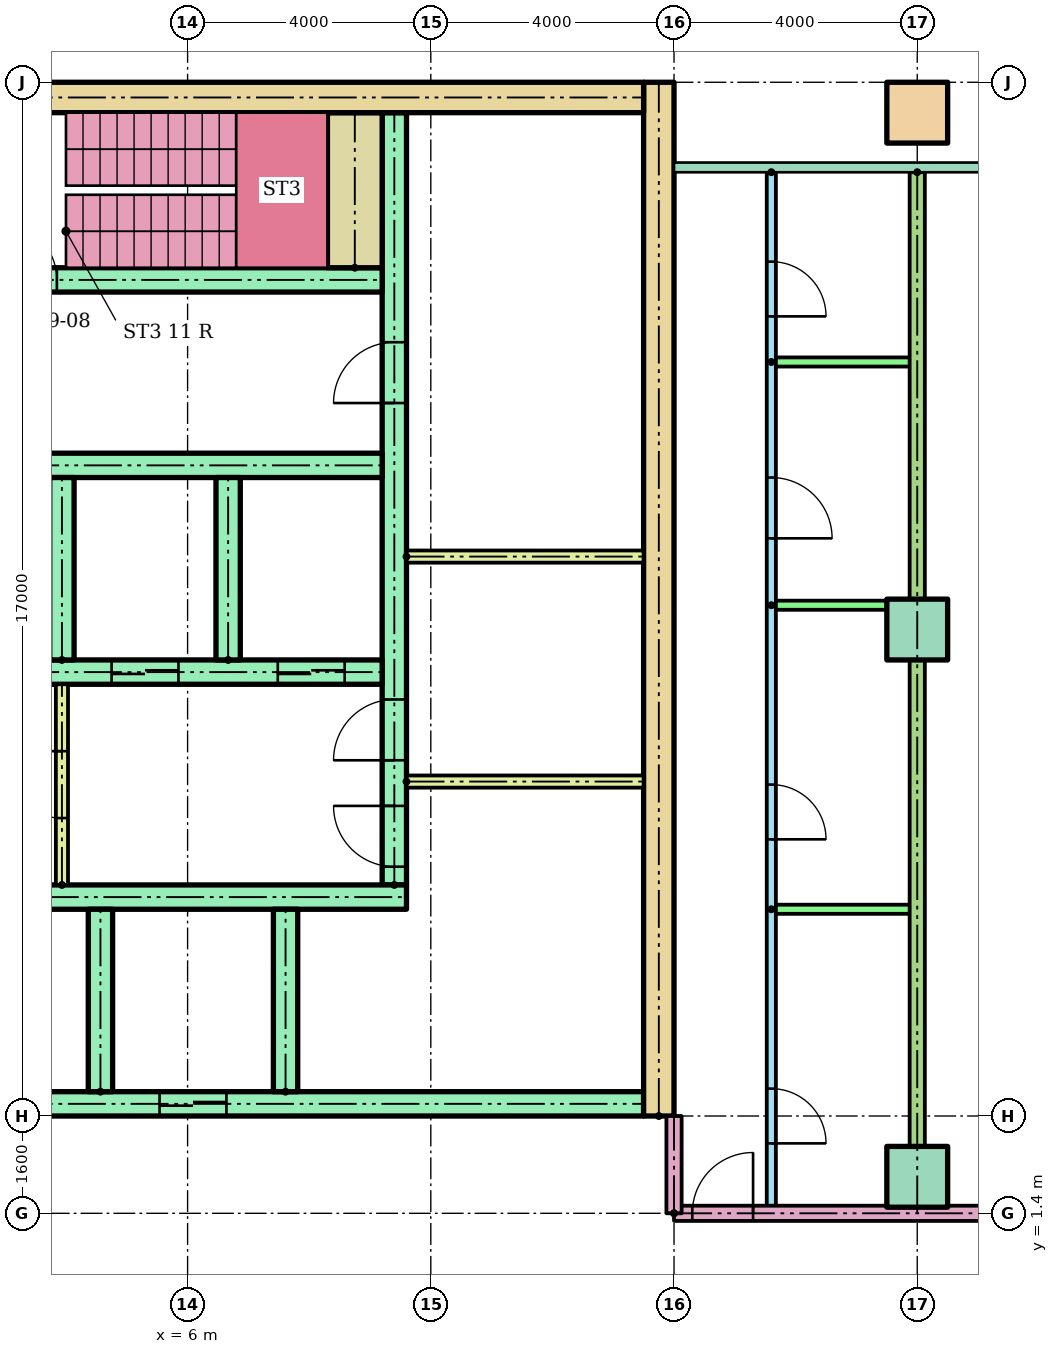
"""IFC4 building model, lengths in metres.
Left out: names, types, materials, properties, quantities, classifications, styles, units other than length and angle.
Written with IfcOpenShell. Run it as: python <this file> out.ifc"""

import sys

from ifc_helpers import new_model, si_unit, direction, frame, frame_2d, origin, origin_2d, place, context, subcontext, project, spatial, rectangle, hollow_rectangle, extrude, element, fill, save


model = new_model("IFC4")
c1 = context("Model", 3, precision=1e-05, world=origin(), true_north=direction((0.0, 1.0)))
c2 = subcontext(c1, "Body", "Model", "MODEL_VIEW")
j1 = project(units=[si_unit("LENGTHUNIT", "METRE"), si_unit("PLANEANGLEUNIT", "RADIAN")], contexts=[c1])
p1 = place(None, origin())
s1 = spatial("IfcSite", under=j1, at=p1, CompositionType="ELEMENT")
p2 = place(p1, origin())
s2 = spatial("IfcBuilding", under=s1, at=p2, CompositionType="ELEMENT")
p3 = place(p2, frame((0.0, 0.0, 37.7)))
s3 = spatial("IfcBuildingStorey", under=s2, at=p3, CompositionType="ELEMENT", Elevation=37.7)
for number, where in (
    (1, (18.0, 2.0, 0.0)),
    (2, (18.0, 11.0, 0.0)),
):
    element("IfcColumn", number, at=place(p3, frame(where)), inside=s3, PredefinedType="COLUMN", context=c2, shape_type="SweptSolid", body=[
        extrude(rectangle(XDim=1.0, YDim=1.0, at=origin_2d()), origin(), (0.0, 0.0, 1.0), 3.9),
    ])
p4 = place(p3, frame((18.0, 19.5, 0.0)))
e3 = element("IfcColumn", 3, at=p4, inside=s3, PredefinedType="COLUMN", context=c2, shape_type="SweptSolid", body=[
    extrude(hollow_rectangle(XDim=1.0, YDim=1.0, WallThickness=0.05, at=origin_2d()), origin(), (0.0, 0.0, 1.0), 3.9),
])
p5 = place(p3, frame((13.75, 3.0, 0.0), z_axis=(0.0, 0.0, 1.0), x_axis=(0.0, 1.0, 0.0)))
e4 = element("IfcWall", 4, at=p5, inside=s3, PredefinedType="SHEAR", context=c2, shape_type="SweptSolid", body=[
    extrude(rectangle(XDim=17.0, YDim=0.5, at=frame_2d((8.5, 0.0))), origin(), (0.0, 0.0, 1.0), 3.62),
])
p6 = place(p3, frame((-13.5, 19.75, 0.0)))
e5 = element("IfcWall", 5, at=p6, inside=s3, PredefinedType="SHEAR", context=c2, shape_type="SweptSolid", body=[
    extrude(rectangle(XDim=27.0, YDim=0.5, at=frame_2d((13.5, 0.0))), origin(), (0.0, 0.0, 1.0), 3.62),
])
p7 = place(p3, frame((9.4, 6.8, 0.0), z_axis=(0.0, 0.0, 1.0), x_axis=(0.0, 1.0, 0.0)))
e6 = element("IfcWall", 6, at=p7, inside=s3, PredefinedType="SHEAR", context=c2, shape_type="SweptSolid", body=[
    extrude(rectangle(XDim=12.7, YDim=0.4, at=frame_2d((6.35, 0.0))), origin(), (0.0, 0.0, 1.0), 3.62),
])
p8 = place(p7, frame((0.3, 0.0, 0.0)))
e7 = element("IfcOpeningElement", 7, at=p8, cuts=e6, PredefinedType="OPENING", context=c2, shape_type="SweptSolid", body=[
    extrude(rectangle(XDim=1.0, YDim=2.1, at=frame_2d((0.5, 1.05))), frame((0.0, 0.21, 0.0), z_axis=(0.0, -1.0, 0.0), x_axis=(1.0, 0.0, 0.0)), (0.0, 0.0, 1.0), 0.42),
])
p9 = place(p7, frame((2.05, 0.0, 0.0)))
e8 = element("IfcOpeningElement", 8, at=p9, cuts=e6, PredefinedType="OPENING", context=c2, shape_type="SweptSolid", body=[
    extrude(rectangle(XDim=1.0, YDim=2.1, at=frame_2d((0.5, 1.05))), frame((0.0, 0.21, 0.0), z_axis=(0.0, -1.0, 0.0), x_axis=(1.0, 0.0, 0.0)), (0.0, 0.0, 1.0), 0.42),
])
p10 = place(p7, frame((7.925, 0.0, 0.0)))
e9 = element("IfcOpeningElement", 9, at=p10, cuts=e6, PredefinedType="OPENING", context=c2, shape_type="SweptSolid", body=[
    extrude(rectangle(XDim=1.0, YDim=2.1, at=frame_2d((0.5, 1.05))), frame((0.0, 0.21, 0.0), z_axis=(0.0, -1.0, 0.0), x_axis=(1.0, 0.0, 0.0)), (0.0, 0.0, 1.0), 0.42),
])
p11 = place(p3, frame((-13.5, 3.2, 0.0)))
e10 = element("IfcWall", 10, at=p11, inside=s3, PredefinedType="SHEAR", context=c2, shape_type="SweptSolid", body=[
    extrude(rectangle(XDim=27.0, YDim=0.4, at=frame_2d((13.5, 0.0))), origin(), (0.0, 0.0, 1.0), 3.62),
])
p12 = place(p11, frame((6.861, 0.0, 0.0)))
e11 = element("IfcOpeningElement", 11, at=p12, cuts=e10, PredefinedType="OPENING", context=c2, shape_type="SweptSolid", body=[
    extrude(rectangle(XDim=1.1, YDim=2.1, at=frame_2d((0.55, 1.05))), frame((0.0, 0.21, 0.0), z_axis=(0.0, -1.0, 0.0), x_axis=(1.0, 0.0, 0.0)), (0.0, 0.0, 1.0), 0.42),
])
p13 = place(p11, frame((9.906, 0.0, 0.0)))
e12 = element("IfcOpeningElement", 12, at=p13, cuts=e10, PredefinedType="OPENING", context=c2, shape_type="SweptSolid", body=[
    extrude(rectangle(XDim=1.1, YDim=2.1, at=frame_2d((0.55, 1.05))), frame((0.0, 0.21, 0.0), z_axis=(0.0, -1.0, 0.0), x_axis=(1.0, 0.0, 0.0)), (0.0, 0.0, 1.0), 0.42),
])
p14 = place(p11, frame((15.994, 0.0, 0.0)))
e13 = element("IfcOpeningElement", 13, at=p14, cuts=e10, PredefinedType="OPENING", context=c2, shape_type="SweptSolid", body=[
    extrude(rectangle(XDim=1.1, YDim=2.1, at=frame_2d((0.55, 1.05))), frame((0.0, 0.21, 0.0), z_axis=(0.0, -1.0, 0.0), x_axis=(1.0, 0.0, 0.0)), (0.0, 0.0, 1.0), 0.42),
])
p15 = place(p11, frame((19.039, 0.0, 0.0)))
e14 = element("IfcOpeningElement", 14, at=p15, cuts=e10, PredefinedType="OPENING", context=c2, shape_type="SweptSolid", body=[
    extrude(rectangle(XDim=1.1, YDim=2.1, at=frame_2d((0.55, 1.05))), frame((0.0, 0.21, 0.0), z_axis=(0.0, -1.0, 0.0), x_axis=(1.0, 0.0, 0.0)), (0.0, 0.0, 1.0), 0.42),
])
p16 = place(p11, frame((12.6, 0.0, 0.0)))
e15 = element("IfcOpeningElement", 15, at=p16, cuts=e10, PredefinedType="OPENING", context=c2, shape_type="SweptSolid", body=[
    extrude(rectangle(XDim=1.8, YDim=2.1, at=frame_2d((0.9, 1.05))), frame((0.0, 0.21, 0.0), z_axis=(0.0, -1.0, 0.0), x_axis=(1.0, 0.0, 0.0)), (0.0, 0.0, 1.0), 0.42),
])
p17 = place(p3, frame((1.522, 6.6, 0.0)))
e16 = element("IfcWall", 16, at=p17, inside=s3, PredefinedType="SHEAR", context=c2, shape_type="SweptSolid", body=[
    extrude(rectangle(XDim=8.078, YDim=0.4, at=frame_2d((4.039, 0.0))), origin(), (0.0, 0.0, 1.0), 3.62),
])
for number, where, z_axis, x_axis in (
    (17, (4.567, 3.4, 0.0), (0.0, 0.0, 1.0), (0.0, 1.0, 0.0)),
    (18, (7.611, 3.4, 0.0), (0.0, 0.0, 1.0), (0.0, 1.0, 0.0)),
):
    element("IfcWall", number, at=place(p3, frame(where, z_axis=z_axis, x_axis=x_axis)), inside=s3, PredefinedType="SHEAR", context=c2, shape_type="SweptSolid", body=[
        extrude(rectangle(XDim=3.0, YDim=0.4, at=frame_2d((1.5, 0.0))), origin(), (0.0, 0.0, 1.0), 3.62),
    ])
p18 = place(p3, frame((1.2, 10.3, 0.0)))
e19 = element("IfcWall", 19, at=p18, inside=s3, PredefinedType="SHEAR", context=c2, shape_type="SweptSolid", body=[
    extrude(rectangle(XDim=8.0, YDim=0.4, at=frame_2d((4.0, 0.0))), origin(), (0.0, 0.0, 1.0), 3.62),
])
p19 = place(p18, frame((3.55, 0.0, 0.0)))
e20 = element("IfcOpeningElement", 20, at=p19, cuts=e19, PredefinedType="OPENING", context=c2, shape_type="SweptSolid", body=[
    extrude(rectangle(XDim=1.1, YDim=2.1, at=frame_2d((0.55, 1.05))), frame((0.0, 0.21, 0.0), z_axis=(0.0, -1.0, 0.0), x_axis=(1.0, 0.0, 0.0)), (0.0, 0.0, 1.0), 0.42),
])
p20 = place(p18, frame((6.283, 0.0, 0.0)))
e21 = element("IfcOpeningElement", 21, at=p20, cuts=e19, PredefinedType="OPENING", context=c2, shape_type="SweptSolid", body=[
    extrude(rectangle(XDim=1.1, YDim=2.1, at=frame_2d((0.55, 1.05))), frame((0.0, 0.21, 0.0), z_axis=(0.0, -1.0, 0.0), x_axis=(1.0, 0.0, 0.0)), (0.0, 0.0, 1.0), 0.42),
])
p21 = place(p18, frame((0.867, 0.0, 0.0)))
e22 = element("IfcOpeningElement", 22, at=p21, cuts=e19, PredefinedType="OPENING", context=c2, shape_type="SweptSolid", body=[
    extrude(rectangle(XDim=1.0, YDim=2.1, at=frame_2d((0.5, 1.05))), frame((0.0, 0.21, 0.0), z_axis=(0.0, -1.0, 0.0), x_axis=(1.0, 0.0, 0.0)), (0.0, 0.0, 1.0), 0.42),
])
p22 = place(p3, frame((1.2, 13.7, 0.0)))
e23 = element("IfcWall", 23, at=p22, inside=s3, PredefinedType="SHEAR", context=c2, shape_type="SweptSolid", body=[
    extrude(rectangle(XDim=8.0, YDim=0.4, at=frame_2d((4.0, 0.0))), origin(), (0.0, 0.0, 1.0), 3.62),
])
for number, where, z_axis, x_axis in (
    (24, (3.933, 10.5, 0.0), (0.0, 0.0, 1.0), (0.0, 1.0, 0.0)),
    (25, (6.667, 10.5, 0.0), (0.0, 0.0, 1.0), (0.0, 1.0, 0.0)),
):
    element("IfcWall", number, at=place(p3, frame(where, z_axis=z_axis, x_axis=x_axis)), inside=s3, PredefinedType="SHEAR", context=c2, shape_type="SweptSolid", body=[
        extrude(rectangle(XDim=3.0, YDim=0.4, at=frame_2d((1.5, 0.0))), origin(), (0.0, 0.0, 1.0), 3.62),
    ])
p23 = place(p3, frame((3.933, 6.8, 0.0), z_axis=(0.0, 0.0, 1.0), x_axis=(0.0, 1.0, 0.0)))
e26 = element("IfcWall", 26, at=p23, inside=s3, PredefinedType="PARTITIONING", context=c2, shape_type="SweptSolid", body=[
    extrude(rectangle(XDim=3.3, YDim=0.2, at=frame_2d((1.65, 0.0))), origin(), (0.0, 0.0, 1.0), 3.62),
])
p24 = place(p23, frame((1.1, 0.0, 0.0)))
e27 = element("IfcOpeningElement", 27, at=p24, cuts=e26, PredefinedType="OPENING", context=c2, shape_type="SweptSolid", body=[
    extrude(rectangle(XDim=1.1, YDim=2.1, at=frame_2d((0.55, 1.05))), frame((0.0, 0.11, 0.0), z_axis=(0.0, -1.0, 0.0), x_axis=(1.0, 0.0, 0.0)), (0.0, 0.0, 1.0), 0.22),
])
p25 = place(p3, frame((-9.2, 16.75, 0.0)))
e28 = element("IfcWall", 28, at=p25, inside=s3, PredefinedType="SHEAR", context=c2, shape_type="SweptSolid", body=[
    extrude(rectangle(XDim=18.4, YDim=0.4, at=frame_2d((9.2, 0.0))), origin(), (0.0, 0.0, 1.0), 3.62),
])
p26 = place(p25, frame((0.1, 0.0, 0.0)))
e29 = element("IfcOpeningElement", 29, at=p26, cuts=e28, PredefinedType="OPENING", context=c2, shape_type="SweptSolid", body=[
    extrude(rectangle(XDim=0.95, YDim=2.1, at=frame_2d((0.475, 1.05))), frame((0.0, 0.21, 0.0), z_axis=(0.0, -1.0, 0.0), x_axis=(1.0, 0.0, 0.0)), (0.0, 0.0, 1.0), 0.42),
])
p27 = place(p25, frame((6.1, 0.0, 0.0)))
e30 = element("IfcOpeningElement", 30, at=p27, cuts=e28, PredefinedType="OPENING", context=c2, shape_type="SweptSolid", body=[
    extrude(rectangle(XDim=0.95, YDim=2.1, at=frame_2d((0.475, 1.05))), frame((0.0, 0.21, 0.0), z_axis=(0.0, -1.0, 0.0), x_axis=(1.0, 0.0, 0.0)), (0.0, 0.0, 1.0), 0.42),
])
p28 = place(p25, frame((12.1, 0.0, 0.0)))
e31 = element("IfcOpeningElement", 31, at=p28, cuts=e28, PredefinedType="OPENING", context=c2, shape_type="SweptSolid", body=[
    extrude(rectangle(XDim=0.95, YDim=2.1, at=frame_2d((0.475, 1.05))), frame((0.0, 0.21, 0.0), z_axis=(0.0, -1.0, 0.0), x_axis=(1.0, 0.0, 0.0)), (0.0, 0.0, 1.0), 0.42),
])
p29 = place(p3, frame((8.75, 16.95, 0.0), z_axis=(0.0, 0.0, 1.0), x_axis=(0.0, 1.0, 0.0)))
e32 = element("IfcWall", 32, at=p29, inside=s3, PredefinedType="SHEAR", context=c2, shape_type="SweptSolid", body=[
    extrude(rectangle(XDim=2.55, YDim=0.9, at=frame_2d((1.275, 0.0))), origin(), (0.0, 0.0, 1.0), 3.62),
])
for number, where in (
    (33, (9.6, 8.5, 0.0)),
    (34, (9.6, 12.2, 0.0)),
):
    element("IfcWall", number, at=place(p3, frame(where)), inside=s3, PredefinedType="PARTITIONING", context=c2, shape_type="SweptSolid", body=[
        extrude(rectangle(XDim=3.9, YDim=0.2, at=frame_2d((1.95, 0.0))), origin(), (0.0, 0.0, 1.0), 3.62),
    ])
p30 = place(p3, frame((14.0, 1.4, 0.0)))
e35 = element("IfcWall", 35, at=p30, inside=s3, PredefinedType="PARTITIONING", context=c2, shape_type="SweptSolid", body=[
    extrude(rectangle(XDim=15.0, YDim=0.25, at=frame_2d((7.5, 0.0))), origin(), (0.0, 0.0, 1.0), 3.1),
])
p31 = place(p30, frame((0.3, 0.0, 0.0)))
e36 = element("IfcOpeningElement", 36, at=p31, cuts=e35, PredefinedType="OPENING", context=c2, shape_type="SweptSolid", body=[
    extrude(rectangle(XDim=1.0, YDim=2.1, at=frame_2d((0.5, 1.05))), frame((0.0, 0.135, 0.0), z_axis=(0.0, -1.0, 0.0), x_axis=(1.0, 0.0, 0.0)), (0.0, 0.0, 1.0), 0.27),
])
p32 = place(p30, frame((9.5, 0.0, 0.0)))
e37 = element("IfcOpeningElement", 37, at=p32, cuts=e35, PredefinedType="OPENING", context=c2, shape_type="SweptSolid", body=[
    extrude(rectangle(XDim=1.0, YDim=2.1, at=frame_2d((0.5, 1.05))), frame((0.0, 0.135, 0.0), z_axis=(0.0, -1.0, 0.0), x_axis=(1.0, 0.0, 0.0)), (0.0, 0.0, 1.0), 0.27),
])
p33 = place(p30, frame((13.5, 0.0, 0.0)))
e38 = element("IfcOpeningElement", 38, at=p33, cuts=e35, PredefinedType="OPENING", context=c2, shape_type="SweptSolid", body=[
    extrude(rectangle(XDim=1.0, YDim=2.1, at=frame_2d((0.5, 1.05))), frame((0.0, 0.135, 0.0), z_axis=(0.0, -1.0, 0.0), x_axis=(1.0, 0.0, 0.0)), (0.0, 0.0, 1.0), 0.27),
])
p34 = place(p3, frame((15.6, 18.521, 0.0), z_axis=(0.0, 0.0, 1.0), x_axis=(0.0, -1.0, 0.0)))
e39 = element("IfcWall", 39, at=p34, inside=s3, PredefinedType="PARTITIONING", context=c2, shape_type="SweptSolid", body=[
    extrude(rectangle(XDim=17.121, YDim=0.15, at=frame_2d((8.561, 0.0))), origin(), (0.0, 0.0, 1.0), 3.1),
])
p35 = place(p34, frame((15.071, 0.0, 0.0)))
e40 = element("IfcOpeningElement", 40, at=p35, cuts=e39, PredefinedType="OPENING", context=c2, shape_type="SweptSolid", body=[
    extrude(rectangle(XDim=0.9, YDim=2.1, at=frame_2d((0.45, 1.05))), frame((0.0, 0.085, 0.0), z_axis=(0.0, -1.0, 0.0), x_axis=(1.0, 0.0, 0.0)), (0.0, 0.0, 1.0), 0.17),
])
p36 = place(p34, frame((10.071, 0.0, 0.0)))
e41 = element("IfcOpeningElement", 41, at=p36, cuts=e39, PredefinedType="OPENING", context=c2, shape_type="SweptSolid", body=[
    extrude(rectangle(XDim=0.9, YDim=2.1, at=frame_2d((0.45, 1.05))), frame((0.0, 0.085, 0.0), z_axis=(0.0, -1.0, 0.0), x_axis=(1.0, 0.0, 0.0)), (0.0, 0.0, 1.0), 0.17),
])
p37 = place(p34, frame((5.021, 0.0, 0.0)))
e42 = element("IfcOpeningElement", 42, at=p37, cuts=e39, PredefinedType="OPENING", context=c2, shape_type="SweptSolid", body=[
    extrude(rectangle(XDim=1.0, YDim=2.1, at=frame_2d((0.5, 1.05))), frame((0.0, 0.085, 0.0), z_axis=(0.0, -1.0, 0.0), x_axis=(1.0, 0.0, 0.0)), (0.0, 0.0, 1.0), 0.17),
])
p38 = place(p34, frame((1.471, 0.0, 0.0)))
e43 = element("IfcOpeningElement", 43, at=p38, cuts=e39, PredefinedType="OPENING", context=c2, shape_type="SweptSolid", body=[
    extrude(rectangle(XDim=0.9, YDim=2.1, at=frame_2d((0.45, 1.05))), frame((0.0, 0.085, 0.0), z_axis=(0.0, -1.0, 0.0), x_axis=(1.0, 0.0, 0.0)), (0.0, 0.0, 1.0), 0.17),
])
for number, where in (
    (44, (15.6, 6.4, 0.0)),
    (45, (15.6, 11.4, 0.0)),
    (46, (15.6, 15.4, 0.0)),
):
    element("IfcWall", number, at=place(p3, frame(where)), inside=s3, PredefinedType="PARTITIONING", context=c2, shape_type="SweptSolid", body=[
        extrude(rectangle(XDim=2.4, YDim=0.15, at=frame_2d((1.2, 0.0))), origin(), (0.0, 0.0, 1.0), 3.1),
    ])
p39 = place(p3, frame((18.0, 18.521, 0.0), z_axis=(0.0, 0.0, 1.0), x_axis=(0.0, -1.0, 0.0)))
e47 = element("IfcWall", 47, at=p39, inside=s3, PredefinedType="PARTITIONING", context=c2, shape_type="SweptSolid", body=[
    extrude(rectangle(XDim=17.121, YDim=0.25, at=frame_2d((8.561, 0.0))), origin(), (0.0, 0.0, 1.0), 3.1),
])
p40 = place(p3, frame((14.0, 1.4, 0.0), z_axis=(0.0, 0.0, 1.0), x_axis=(0.0, 1.0, 0.0)))
e48 = element("IfcWall", 48, at=p40, inside=s3, PredefinedType="PARTITIONING", context=c2, shape_type="SweptSolid", body=[
    extrude(rectangle(XDim=1.6, YDim=0.25, at=frame_2d((0.8, 0.0))), origin(), (0.0, 0.0, 1.0), 3.1),
])
p41 = place(p15, origin())
e49 = element("IfcDoor", 49, at=p41, inside=s3, OperationType="SLIDING_TO_LEFT", PredefinedType="DOOR", context=c2, shape_type="SweptSolid", body=[
    extrude(rectangle(XDim=1.1, YDim=2.1, at=frame_2d((0.55, 1.05))), frame((0.0, 0.025, 0.0), z_axis=(0.0, -1.0, 0.0), x_axis=(1.0, 0.0, 0.0)), (0.0, 0.0, 1.0), 0.05),
])
fill(e14, e49)
p42 = place(p19, origin())
e50 = element("IfcDoor", 50, at=p42, inside=s3, OperationType="SLIDING_TO_LEFT", PredefinedType="DOOR", context=c2, shape_type="SweptSolid", body=[
    extrude(rectangle(XDim=1.1, YDim=2.1, at=frame_2d((0.55, 1.05))), frame((0.0, 0.025, 0.0), z_axis=(0.0, -1.0, 0.0), x_axis=(1.0, 0.0, 0.0)), (0.0, 0.0, 1.0), 0.05),
])
fill(e20, e50)
p43 = place(p20, origin())
e51 = element("IfcDoor", 51, at=p43, inside=s3, OperationType="SLIDING_TO_LEFT", PredefinedType="DOOR", context=c2, shape_type="SweptSolid", body=[
    extrude(rectangle(XDim=1.1, YDim=2.1, at=frame_2d((0.55, 1.05))), frame((0.0, 0.025, 0.0), z_axis=(0.0, -1.0, 0.0), x_axis=(1.0, 0.0, 0.0)), (0.0, 0.0, 1.0), 0.05),
])
fill(e21, e51)
p44 = place(p24, origin())
e52 = element("IfcDoor", 52, at=p44, inside=s3, OperationType="SINGLE_SWING_RIGHT", PredefinedType="DOOR", context=c2, shape_type="SweptSolid", body=[
    extrude(rectangle(XDim=1.1, YDim=2.1, at=frame_2d((0.55, 1.05))), frame((0.0, 0.025, 0.0), z_axis=(0.0, -1.0, 0.0), x_axis=(1.0, 0.0, 0.0)), (0.0, 0.0, 1.0), 0.05),
])
fill(e27, e52)
p45 = place(p28, origin())
e53 = element("IfcDoor", 53, at=p45, inside=s3, OperationType="SINGLE_SWING_LEFT", PredefinedType="DOOR", context=c2, shape_type="SweptSolid", body=[
    extrude(rectangle(XDim=0.95, YDim=2.1, at=frame_2d((0.475, 1.05))), frame((0.0, 0.025, 0.0), z_axis=(0.0, -1.0, 0.0), x_axis=(1.0, 0.0, 0.0)), (0.0, 0.0, 1.0), 0.05),
])
fill(e31, e53)
p46 = place(p8, origin())
e54 = element("IfcDoor", 54, at=p46, inside=s3, OperationType="SINGLE_SWING_RIGHT", PredefinedType="DOOR", context=c2, shape_type="SweptSolid", body=[
    extrude(rectangle(XDim=1.0, YDim=2.1, at=frame_2d((0.5, 1.05))), frame((0.0, 0.025, 0.0), z_axis=(0.0, -1.0, 0.0), x_axis=(1.0, 0.0, 0.0)), (0.0, 0.0, 1.0), 0.05),
])
fill(e7, e54)
p47 = place(p9, origin())
e55 = element("IfcDoor", 55, at=p47, inside=s3, OperationType="SINGLE_SWING_LEFT", PredefinedType="DOOR", context=c2, shape_type="SweptSolid", body=[
    extrude(rectangle(XDim=1.0, YDim=2.1, at=frame_2d((0.5, 1.05))), frame((0.0, 0.025, 0.0), z_axis=(0.0, -1.0, 0.0), x_axis=(1.0, 0.0, 0.0)), (0.0, 0.0, 1.0), 0.05),
])
fill(e8, e55)
p48 = place(p10, origin())
e56 = element("IfcDoor", 56, at=p48, inside=s3, OperationType="SINGLE_SWING_LEFT", PredefinedType="DOOR", context=c2, shape_type="SweptSolid", body=[
    extrude(rectangle(XDim=1.0, YDim=2.1, at=frame_2d((0.5, 1.05))), frame((0.0, 0.025, 0.0), z_axis=(0.0, -1.0, 0.0), x_axis=(1.0, 0.0, 0.0)), (0.0, 0.0, 1.0), 0.05),
])
fill(e9, e56)
p49 = place(p35, origin())
e57 = element("IfcDoor", 57, at=p49, inside=s3, OperationType="SINGLE_SWING_RIGHT", PredefinedType="DOOR", context=c2, shape_type="SweptSolid", body=[
    extrude(rectangle(XDim=0.9, YDim=2.1, at=frame_2d((0.45, 1.05))), frame((0.0, 0.025, 0.0), z_axis=(0.0, -1.0, 0.0), x_axis=(1.0, 0.0, 0.0)), (0.0, 0.0, 1.0), 0.05),
])
fill(e40, e57)
p50 = place(p36, origin())
e58 = element("IfcDoor", 58, at=p50, inside=s3, OperationType="SINGLE_SWING_RIGHT", PredefinedType="DOOR", context=c2, shape_type="SweptSolid", body=[
    extrude(rectangle(XDim=0.9, YDim=2.1, at=frame_2d((0.45, 1.05))), frame((0.0, 0.025, 0.0), z_axis=(0.0, -1.0, 0.0), x_axis=(1.0, 0.0, 0.0)), (0.0, 0.0, 1.0), 0.05),
])
fill(e41, e58)
p51 = place(p37, origin())
e59 = element("IfcDoor", 59, at=p51, inside=s3, OperationType="SINGLE_SWING_RIGHT", PredefinedType="DOOR", context=c2, shape_type="SweptSolid", body=[
    extrude(rectangle(XDim=1.0, YDim=2.1, at=frame_2d((0.5, 1.05))), frame((0.0, 0.025, 0.0), z_axis=(0.0, -1.0, 0.0), x_axis=(1.0, 0.0, 0.0)), (0.0, 0.0, 1.0), 0.05),
])
fill(e42, e59)
p52 = place(p38, origin())
e60 = element("IfcDoor", 60, at=p52, inside=s3, OperationType="SINGLE_SWING_RIGHT", PredefinedType="DOOR", context=c2, shape_type="SweptSolid", body=[
    extrude(rectangle(XDim=0.9, YDim=2.1, at=frame_2d((0.45, 1.05))), frame((0.0, 0.025, 0.0), z_axis=(0.0, -1.0, 0.0), x_axis=(1.0, 0.0, 0.0)), (0.0, 0.0, 1.0), 0.05),
])
fill(e43, e60)
p53 = place(p31, origin())
e61 = element("IfcDoor", 61, at=p53, inside=s3, OperationType="SINGLE_SWING_RIGHT", PredefinedType="DOOR", context=c2, shape_type="SweptSolid", body=[
    extrude(rectangle(XDim=1.0, YDim=2.1, at=frame_2d((0.5, 1.05))), frame((0.0, 0.025, 0.0), z_axis=(0.0, -1.0, 0.0), x_axis=(1.0, 0.0, 0.0)), (0.0, 0.0, 1.0), 0.05),
])
fill(e36, e61)
save(model, sys.argv[1])
